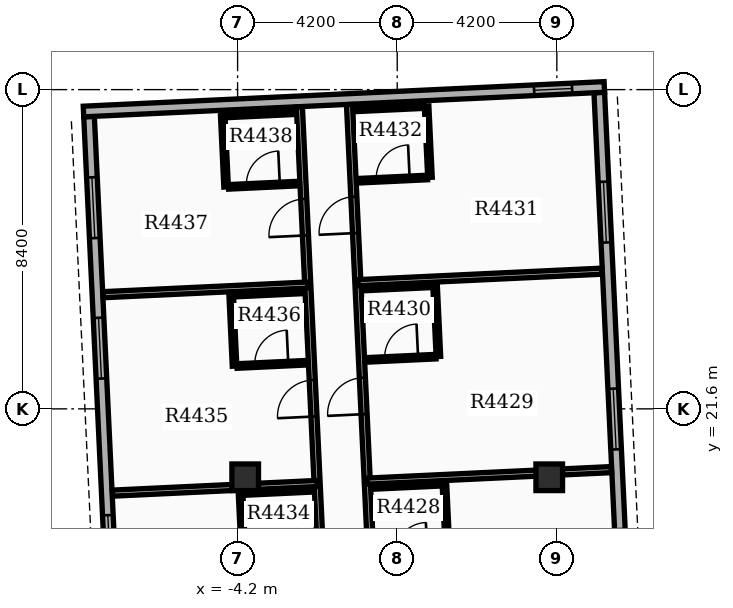
"""IFC4 building model, lengths in metres.
Left out: names, types, materials, properties, quantities, classifications, styles, units other than length and angle.
Written with IfcOpenShell. Run it as: python <this file> out.ifc"""

import sys

from ifc_helpers import new_model, si_unit, direction, frame, frame_2d, origin, origin_2d, place, context, subcontext, project, spatial, rectangle, extrude, element, fill, save


model = new_model("IFC4")
c1 = context("Model", 3, precision=1e-05, world=origin(), true_north=direction((0.0, 1.0)))
c2 = subcontext(c1, "Body", "Model", "MODEL_VIEW")
j1 = project(units=[si_unit("LENGTHUNIT", "METRE"), si_unit("PLANEANGLEUNIT", "RADIAN")], contexts=[c1])
p1 = place(None, origin())
s1 = spatial("IfcSite", under=j1, at=p1, CompositionType="ELEMENT")
p2 = place(p1, origin())
s2 = spatial("IfcBuilding", under=s1, at=p2, CompositionType="ELEMENT")
p3 = place(p2, frame((0.0, 0.0, 277.2)))
s3 = spatial("IfcBuildingStorey", under=s2, at=p3, CompositionType="ELEMENT", Elevation=277.2)
for number, where, z_axis, x_axis in (
    (1, (-4.0, 19.8, 0.0), (0.0, 0.0, 1.0), (1.0, 0.0, 0.0)),
    (2, (4.0, 19.8, 0.0), (0.0, 0.0, 1.0), (1.0, 0.0, 0.0)),
):
    element("IfcColumn", number, at=place(p3, frame(where, z_axis=z_axis, x_axis=x_axis)), inside=s3, PredefinedType="COLUMN", context=c2, shape_type="SweptSolid", body=[
        extrude(rectangle(XDim=0.7, YDim=0.7, at=origin_2d()), origin(), (0.0, 0.0, 1.0), 3.9),
    ])
p4 = place(p3, frame((6.009, 15.24, 0.0), z_axis=(0.0, 0.0, 1.0), x_axis=(-0.047101163748, 0.998890124275, 0.0)))
e3 = element("IfcWall", 3, at=p4, inside=s3, PredefinedType="STANDARD", context=c2, shape_type="SweptSolid", body=[
    extrude(rectangle(XDim=14.7, YDim=0.28, at=frame_2d((7.35, 0.0))), origin(), (0.0, 0.0, 1.0), 3.18),
])
p5 = place(p4, frame((1.6, 0.0, 0.8)))
e4 = element("IfcOpeningElement", 4, at=p5, cuts=e3, PredefinedType="OPENING", context=c2, shape_type="SweptSolid", body=[
    extrude(rectangle(XDim=1.6, YDim=1.7, at=frame_2d((0.8, 0.85))), frame((0.0, 0.15, 0.0), z_axis=(0.0, -1.0, 0.0), x_axis=(1.0, 0.0, 0.0)), (0.0, 0.0, 1.0), 0.3),
])
p6 = place(p4, frame((5.3, 0.0, 0.8)))
e5 = element("IfcOpeningElement", 5, at=p6, cuts=e3, PredefinedType="OPENING", context=c2, shape_type="SweptSolid", body=[
    extrude(rectangle(XDim=1.6, YDim=1.7, at=frame_2d((0.8, 0.85))), frame((0.0, 0.15, 0.0), z_axis=(0.0, -1.0, 0.0), x_axis=(1.0, 0.0, 0.0)), (0.0, 0.0, 1.0), 0.3),
])
p7 = place(p4, frame((10.75, 0.0, 0.8)))
e6 = element("IfcOpeningElement", 6, at=p7, cuts=e3, PredefinedType="OPENING", context=c2, shape_type="SweptSolid", body=[
    extrude(rectangle(XDim=1.6, YDim=1.7, at=frame_2d((0.8, 0.85))), frame((0.0, 0.15, 0.0), z_axis=(0.0, -1.0, 0.0), x_axis=(1.0, 0.0, 0.0)), (0.0, 0.0, 1.0), 0.3),
])
p8 = place(p3, frame((-8.109, 29.291, 0.0), z_axis=(0.0, 0.0, 1.0), x_axis=(0.047117735191, -0.998889342735, 0.0)))
e7 = element("IfcWall", 7, at=p8, inside=s3, PredefinedType="STANDARD", context=c2, shape_type="SweptSolid", body=[
    extrude(rectangle(XDim=14.7, YDim=0.28, at=frame_2d((7.35, 0.0))), origin(), (0.0, 0.0, 1.0), 3.18),
])
p9 = place(p8, frame((1.6, 0.0, 0.8)))
e8 = element("IfcOpeningElement", 8, at=p9, cuts=e7, PredefinedType="OPENING", context=c2, shape_type="SweptSolid", body=[
    extrude(rectangle(XDim=1.6, YDim=1.7, at=frame_2d((0.8, 0.85))), frame((0.0, 0.15, 0.0), z_axis=(0.0, -1.0, 0.0), x_axis=(1.0, 0.0, 0.0)), (0.0, 0.0, 1.0), 0.3),
])
p10 = place(p8, frame((5.3, 0.0, 0.8)))
e9 = element("IfcOpeningElement", 9, at=p10, cuts=e7, PredefinedType="OPENING", context=c2, shape_type="SweptSolid", body=[
    extrude(rectangle(XDim=1.6, YDim=1.7, at=frame_2d((0.8, 0.85))), frame((0.0, 0.15, 0.0), z_axis=(0.0, -1.0, 0.0), x_axis=(1.0, 0.0, 0.0)), (0.0, 0.0, 1.0), 0.3),
])
p11 = place(p8, frame((10.5, 0.0, 0.8)))
e10 = element("IfcOpeningElement", 10, at=p11, cuts=e7, PredefinedType="OPENING", context=c2, shape_type="SweptSolid", body=[
    extrude(rectangle(XDim=1.6, YDim=1.7, at=frame_2d((0.8, 0.85))), frame((0.0, 0.15, 0.0), z_axis=(0.0, -1.0, 0.0), x_axis=(1.0, 0.0, 0.0)), (0.0, 0.0, 1.0), 0.3),
])
p12 = place(p3, frame((5.45, 30.07, 0.0), z_axis=(0.0, 0.0, 1.0), x_axis=(-0.998890092147, -0.047101845086, 0.0)))
e11 = element("IfcWall", 11, at=p12, inside=s3, PredefinedType="STANDARD", context=c2, shape_type="SweptSolid", body=[
    extrude(rectangle(XDim=13.72, YDim=0.28, at=frame_2d((6.86, 0.0))), origin(), (0.0, 0.0, 1.0), 3.18),
])
p13 = place(p12, frame((0.85, 0.0, 0.85)))
e12 = element("IfcOpeningElement", 12, at=p13, cuts=e11, PredefinedType="OPENING", context=c2, shape_type="SweptSolid", body=[
    extrude(rectangle(XDim=1.0, YDim=1.5, at=frame_2d((0.5, 0.75))), frame((0.0, 0.15, 0.0), z_axis=(0.0, -1.0, 0.0), x_axis=(1.0, 0.0, 0.0)), (0.0, 0.0, 1.0), 0.3),
])
p14 = place(p3, frame((-0.549, 14.61, 0.0), z_axis=(0.0, 0.0, 1.0), x_axis=(-0.047113901593, 0.998889523559, 0.0)))
e13 = element("IfcWall", 13, at=p14, inside=s3, PredefinedType="PARTITIONING", context=c2, shape_type="SweptSolid", body=[
    extrude(rectangle(XDim=15.012, YDim=0.16, at=frame_2d((7.506, 0.0))), origin(), (0.0, 0.0, 1.0), 3.17),
])
p15 = place(p14, frame((1.122, 0.0, 0.0)))
e14 = element("IfcOpeningElement", 14, at=p15, cuts=e13, PredefinedType="OPENING", context=c2, shape_type="SweptSolid", body=[
    extrude(rectangle(XDim=0.96, YDim=2.15, at=frame_2d((0.48, 1.075))), frame((0.0, 0.09, 0.0), z_axis=(0.0, -1.0, 0.0), x_axis=(1.0, 0.0, 0.0)), (0.0, 0.0, 1.0), 0.18),
])
p16 = place(p14, frame((6.858, 0.0, 0.0)))
e15 = element("IfcOpeningElement", 15, at=p16, cuts=e13, PredefinedType="OPENING", context=c2, shape_type="SweptSolid", body=[
    extrude(rectangle(XDim=0.96, YDim=2.15, at=frame_2d((0.48, 1.075))), frame((0.0, 0.09, 0.0), z_axis=(0.0, -1.0, 0.0), x_axis=(1.0, 0.0, 0.0)), (0.0, 0.0, 1.0), 0.18),
])
p17 = place(p14, frame((11.628, 0.0, 0.0)))
e16 = element("IfcOpeningElement", 16, at=p17, cuts=e13, PredefinedType="OPENING", context=c2, shape_type="SweptSolid", body=[
    extrude(rectangle(XDim=0.96, YDim=2.15, at=frame_2d((0.48, 1.075))), frame((0.0, 0.09, 0.0), z_axis=(0.0, -1.0, 0.0), x_axis=(1.0, 0.0, 0.0)), (0.0, 0.0, 1.0), 0.18),
])
p18 = place(p3, frame((-0.789, 19.699, 0.0), z_axis=(0.0, 0.0, 1.0), x_axis=(0.99888993043, 0.047105274497, 0.0)))
e17 = element("IfcWall", 17, at=p18, inside=s3, PredefinedType="PARTITIONING", context=c2, shape_type="SweptSolid", body=[
    extrude(rectangle(XDim=6.432, YDim=0.16, at=frame_2d((3.216, 0.0))), origin(), (0.0, 0.0, 1.0), 3.17),
])
p19 = place(p3, frame((-0.641, 19.545, 0.0), z_axis=(0.0, 0.0, 1.0), x_axis=(0.998890786574, 0.047087116047, 0.0)))
e18 = element("IfcWall", 18, at=p19, inside=s3, PredefinedType="PARTITIONING", context=c2, shape_type="SweptSolid", body=[
    extrude(rectangle(XDim=1.82, YDim=0.12, at=frame_2d((0.91, 0.0))), origin(), (0.0, 0.0, 1.0), 3.17),
])
p20 = place(p3, frame((1.33, 17.756, 0.0), z_axis=(0.0, 0.0, 1.0), x_axis=(-0.047139425368, 0.998888319371, 0.0)))
e19 = element("IfcWall", 19, at=p20, inside=s3, PredefinedType="PARTITIONING", context=c2, shape_type="SweptSolid", body=[
    extrude(rectangle(XDim=1.88, YDim=0.12, at=frame_2d((0.94, 0.0))), origin(), (0.0, 0.0, 1.0), 3.17),
])
p21 = place(p3, frame((-1.035, 24.92, 0.0), z_axis=(0.0, 0.0, 1.0), x_axis=(0.99888993043, 0.047105274497, 0.0)))
e20 = element("IfcWall", 20, at=p21, inside=s3, PredefinedType="PARTITIONING", context=c2, shape_type="SweptSolid", body=[
    extrude(rectangle(XDim=6.432, YDim=0.16, at=frame_2d((3.216, 0.0))), origin(), (0.0, 0.0, 1.0), 3.17),
])
p22 = place(p3, frame((-0.799, 22.889, 0.0), z_axis=(0.0, 0.0, 1.0), x_axis=(0.998890786574, 0.047087116047, 0.0)))
e21 = element("IfcWall", 21, at=p22, inside=s3, PredefinedType="PARTITIONING", context=c2, shape_type="SweptSolid", body=[
    extrude(rectangle(XDim=1.82, YDim=0.12, at=frame_2d((0.91, 0.0))), origin(), (0.0, 0.0, 1.0), 3.17),
])
p23 = place(p22, frame((0.47, 0.0, 0.0)))
e22 = element("IfcOpeningElement", 22, at=p23, cuts=e21, PredefinedType="OPENING", context=c2, shape_type="SweptSolid", body=[
    extrude(rectangle(XDim=0.88, YDim=2.1, at=frame_2d((0.44, 1.05))), frame((0.0, 0.07, 0.0), z_axis=(0.0, -1.0, 0.0), x_axis=(1.0, 0.0, 0.0)), (0.0, 0.0, 1.0), 0.14),
])
p24 = place(p3, frame((-0.888, 24.767, 0.0), z_axis=(0.0, 0.0, 1.0), x_axis=(0.998891083954, 0.047080807099, 0.0)))
e23 = element("IfcWall", 23, at=p24, inside=s3, PredefinedType="PARTITIONING", context=c2, shape_type="SweptSolid", body=[
    extrude(rectangle(XDim=1.82, YDim=0.12, at=frame_2d((0.91, 0.0))), origin(), (0.0, 0.0, 1.0), 3.17),
])
p25 = place(p3, frame((1.084, 22.978, 0.0), z_axis=(0.0, 0.0, 1.0), x_axis=(-0.04700985207, 0.998894425757, 0.0)))
e24 = element("IfcWall", 24, at=p25, inside=s3, PredefinedType="PARTITIONING", context=c2, shape_type="SweptSolid", body=[
    extrude(rectangle(XDim=1.88, YDim=0.12, at=frame_2d((0.94, 0.0))), origin(), (0.0, 0.0, 1.0), 3.17),
])
p26 = place(p3, frame((-1.021, 27.603, 0.0), z_axis=(0.0, 0.0, 1.0), x_axis=(0.998891083954, 0.047080807099, 0.0)))
e25 = element("IfcWall", 25, at=p26, inside=s3, PredefinedType="PARTITIONING", context=c2, shape_type="SweptSolid", body=[
    extrude(rectangle(XDim=1.82, YDim=0.12, at=frame_2d((0.91, 0.0))), origin(), (0.0, 0.0, 1.0), 3.17),
])
p27 = place(p26, frame((0.47, 0.0, 0.0)))
e26 = element("IfcOpeningElement", 26, at=p27, cuts=e25, PredefinedType="OPENING", context=c2, shape_type="SweptSolid", body=[
    extrude(rectangle(XDim=0.88, YDim=2.1, at=frame_2d((0.44, 1.05))), frame((0.0, 0.07, 0.0), z_axis=(0.0, -1.0, 0.0), x_axis=(1.0, 0.0, 0.0)), (0.0, 0.0, 1.0), 0.14),
])
p28 = place(p3, frame((-1.11, 29.48, 0.0), z_axis=(0.0, 0.0, 1.0), x_axis=(0.998891083954, 0.047080807099, 0.0)))
e27 = element("IfcWall", 27, at=p28, inside=s3, PredefinedType="PARTITIONING", context=c2, shape_type="SweptSolid", body=[
    extrude(rectangle(XDim=1.82, YDim=0.12, at=frame_2d((0.91, 0.0))), origin(), (0.0, 0.0, 1.0), 3.17),
])
p29 = place(p3, frame((0.862, 27.691, 0.0), z_axis=(0.0, 0.0, 1.0), x_axis=(-0.047145540913, 0.998888030748, 0.0)))
e28 = element("IfcWall", 28, at=p29, inside=s3, PredefinedType="PARTITIONING", context=c2, shape_type="SweptSolid", body=[
    extrude(rectangle(XDim=1.88, YDim=0.12, at=frame_2d((0.94, 0.0))), origin(), (0.0, 0.0, 1.0), 3.17),
])
p30 = place(p3, frame((-1.867, 14.548, 0.0), z_axis=(0.0, 0.0, 1.0), x_axis=(-0.047097674677, 0.998890288791, 0.0)))
e29 = element("IfcWall", 29, at=p30, inside=s3, PredefinedType="PARTITIONING", context=c2, shape_type="SweptSolid", body=[
    extrude(rectangle(XDim=15.012, YDim=0.16, at=frame_2d((7.506, 0.0))), origin(), (0.0, 0.0, 1.0), 3.17),
])
p31 = place(p30, frame((1.122, 0.0, 0.0)))
e30 = element("IfcOpeningElement", 30, at=p31, cuts=e29, PredefinedType="OPENING", context=c2, shape_type="SweptSolid", body=[
    extrude(rectangle(XDim=0.96, YDim=2.15, at=frame_2d((0.48, 1.075))), frame((0.0, 0.09, 0.0), z_axis=(0.0, -1.0, 0.0), x_axis=(1.0, 0.0, 0.0)), (0.0, 0.0, 1.0), 0.18),
])
p32 = place(p30, frame((6.858, 0.0, 0.0)))
e31 = element("IfcOpeningElement", 31, at=p32, cuts=e29, PredefinedType="OPENING", context=c2, shape_type="SweptSolid", body=[
    extrude(rectangle(XDim=0.96, YDim=2.15, at=frame_2d((0.48, 1.075))), frame((0.0, 0.09, 0.0), z_axis=(0.0, -1.0, 0.0), x_axis=(1.0, 0.0, 0.0)), (0.0, 0.0, 1.0), 0.18),
])
p33 = place(p30, frame((11.628, 0.0, 0.0)))
e32 = element("IfcOpeningElement", 32, at=p33, cuts=e29, PredefinedType="OPENING", context=c2, shape_type="SweptSolid", body=[
    extrude(rectangle(XDim=0.96, YDim=2.15, at=frame_2d((0.48, 1.075))), frame((0.0, 0.09, 0.0), z_axis=(0.0, -1.0, 0.0), x_axis=(1.0, 0.0, 0.0)), (0.0, 0.0, 1.0), 0.18),
])
p34 = place(p3, frame((-2.107, 19.636, 0.0), z_axis=(0.0, 0.0, 1.0), x_axis=(-0.99889066387, -0.04708971898, 0.0)))
e33 = element("IfcWall", 33, at=p34, inside=s3, PredefinedType="PARTITIONING", context=c2, shape_type="SweptSolid", body=[
    extrude(rectangle(XDim=5.392, YDim=0.16, at=frame_2d((2.696, 0.0))), origin(), (0.0, 0.0, 1.0), 3.17),
])
p35 = place(p3, frame((-4.058, 19.385, 0.0), z_axis=(0.0, 0.0, 1.0), x_axis=(0.998890786574, 0.047087116047, 0.0)))
e34 = element("IfcWall", 34, at=p35, inside=s3, PredefinedType="PARTITIONING", context=c2, shape_type="SweptSolid", body=[
    extrude(rectangle(XDim=1.82, YDim=0.12, at=frame_2d((0.91, 0.0))), origin(), (0.0, 0.0, 1.0), 3.17),
])
p36 = place(p3, frame((-4.034, 17.503, 0.0), z_axis=(0.0, 0.0, 1.0), x_axis=(-0.047139425368, 0.998888319371, 0.0)))
e35 = element("IfcWall", 35, at=p36, inside=s3, PredefinedType="PARTITIONING", context=c2, shape_type="SweptSolid", body=[
    extrude(rectangle(XDim=1.88, YDim=0.12, at=frame_2d((0.94, 0.0))), origin(), (0.0, 0.0, 1.0), 3.17),
])
p37 = place(p3, frame((-2.354, 24.858, 0.0), z_axis=(0.0, 0.0, 1.0), x_axis=(-0.99889066387, -0.04708971898, 0.0)))
e36 = element("IfcWall", 36, at=p37, inside=s3, PredefinedType="PARTITIONING", context=c2, shape_type="SweptSolid", body=[
    extrude(rectangle(XDim=5.392, YDim=0.16, at=frame_2d((2.696, 0.0))), origin(), (0.0, 0.0, 1.0), 3.17),
])
p38 = place(p3, frame((-4.215, 22.728, 0.0), z_axis=(0.0, 0.0, 1.0), x_axis=(0.998891083954, 0.047080807099, 0.0)))
e37 = element("IfcWall", 37, at=p38, inside=s3, PredefinedType="PARTITIONING", context=c2, shape_type="SweptSolid", body=[
    extrude(rectangle(XDim=1.82, YDim=0.12, at=frame_2d((0.91, 0.0))), origin(), (0.0, 0.0, 1.0), 3.17),
])
p39 = place(p38, frame((0.47, 0.0, 0.0)))
e38 = element("IfcOpeningElement", 38, at=p39, cuts=e37, PredefinedType="OPENING", context=c2, shape_type="SweptSolid", body=[
    extrude(rectangle(XDim=0.88, YDim=2.1, at=frame_2d((0.44, 1.05))), frame((0.0, 0.07, 0.0), z_axis=(0.0, -1.0, 0.0), x_axis=(1.0, 0.0, 0.0)), (0.0, 0.0, 1.0), 0.14),
])
p40 = place(p3, frame((-4.304, 24.606, 0.0), z_axis=(0.0, 0.0, 1.0), x_axis=(0.998891083954, 0.047080807099, 0.0)))
e39 = element("IfcWall", 39, at=p40, inside=s3, PredefinedType="PARTITIONING", context=c2, shape_type="SweptSolid", body=[
    extrude(rectangle(XDim=1.82, YDim=0.12, at=frame_2d((0.91, 0.0))), origin(), (0.0, 0.0, 1.0), 3.17),
])
p41 = place(p3, frame((-4.28, 22.725, 0.0), z_axis=(0.0, 0.0, 1.0), x_axis=(-0.047139425368, 0.998888319371, 0.0)))
e40 = element("IfcWall", 40, at=p41, inside=s3, PredefinedType="PARTITIONING", context=c2, shape_type="SweptSolid", body=[
    extrude(rectangle(XDim=1.88, YDim=0.12, at=frame_2d((0.94, 0.0))), origin(), (0.0, 0.0, 1.0), 3.17),
])
p42 = place(p3, frame((-4.438, 27.441, 0.0), z_axis=(0.0, 0.0, 1.0), x_axis=(0.998890786574, 0.047087116047, 0.0)))
e41 = element("IfcWall", 41, at=p42, inside=s3, PredefinedType="PARTITIONING", context=c2, shape_type="SweptSolid", body=[
    extrude(rectangle(XDim=1.82, YDim=0.12, at=frame_2d((0.91, 0.0))), origin(), (0.0, 0.0, 1.0), 3.17),
])
p43 = place(p42, frame((0.47, 0.0, 0.0)))
e42 = element("IfcOpeningElement", 42, at=p43, cuts=e41, PredefinedType="OPENING", context=c2, shape_type="SweptSolid", body=[
    extrude(rectangle(XDim=0.88, YDim=2.1, at=frame_2d((0.44, 1.05))), frame((0.0, 0.07, 0.0), z_axis=(0.0, -1.0, 0.0), x_axis=(1.0, 0.0, 0.0)), (0.0, 0.0, 1.0), 0.14),
])
p44 = place(p3, frame((-4.526, 29.319, 0.0), z_axis=(0.0, 0.0, 1.0), x_axis=(0.998890786574, 0.047087116047, 0.0)))
e43 = element("IfcWall", 43, at=p44, inside=s3, PredefinedType="PARTITIONING", context=c2, shape_type="SweptSolid", body=[
    extrude(rectangle(XDim=1.82, YDim=0.12, at=frame_2d((0.91, 0.0))), origin(), (0.0, 0.0, 1.0), 3.17),
])
p45 = place(p3, frame((-4.502, 27.438, 0.0), z_axis=(0.0, 0.0, 1.0), x_axis=(-0.047139425368, 0.998888319371, 0.0)))
e44 = element("IfcWall", 44, at=p45, inside=s3, PredefinedType="PARTITIONING", context=c2, shape_type="SweptSolid", body=[
    extrude(rectangle(XDim=1.88, YDim=0.12, at=frame_2d((0.94, 0.0))), origin(), (0.0, 0.0, 1.0), 3.17),
])
p46 = place(p6, origin())
e45 = element("IfcWindow", 45, at=p46, inside=s3, PartitioningType="SINGLE_PANEL", PredefinedType="WINDOW", context=c2, shape_type="SweptSolid", body=[
    extrude(rectangle(XDim=1.6, YDim=1.7, at=frame_2d((0.8, 0.85))), frame((0.0, 0.03, 0.0), z_axis=(0.0, -1.0, 0.0), x_axis=(1.0, 0.0, 0.0)), (0.0, 0.0, 1.0), 0.06),
])
fill(e5, e45)
p47 = place(p7, origin())
e46 = element("IfcWindow", 46, at=p47, inside=s3, PartitioningType="SINGLE_PANEL", PredefinedType="WINDOW", context=c2, shape_type="SweptSolid", body=[
    extrude(rectangle(XDim=1.6, YDim=1.7, at=frame_2d((0.8, 0.85))), frame((0.0, 0.03, 0.0), z_axis=(0.0, -1.0, 0.0), x_axis=(1.0, 0.0, 0.0)), (0.0, 0.0, 1.0), 0.06),
])
fill(e6, e46)
p48 = place(p9, origin())
e47 = element("IfcWindow", 47, at=p48, inside=s3, PartitioningType="SINGLE_PANEL", PredefinedType="WINDOW", context=c2, shape_type="SweptSolid", body=[
    extrude(rectangle(XDim=1.6, YDim=1.7, at=frame_2d((0.8, 0.85))), frame((0.0, 0.03, 0.0), z_axis=(0.0, -1.0, 0.0), x_axis=(1.0, 0.0, 0.0)), (0.0, 0.0, 1.0), 0.06),
])
fill(e8, e47)
p49 = place(p10, origin())
e48 = element("IfcWindow", 48, at=p49, inside=s3, PartitioningType="SINGLE_PANEL", PredefinedType="WINDOW", context=c2, shape_type="SweptSolid", body=[
    extrude(rectangle(XDim=1.6, YDim=1.7, at=frame_2d((0.8, 0.85))), frame((0.0, 0.03, 0.0), z_axis=(0.0, -1.0, 0.0), x_axis=(1.0, 0.0, 0.0)), (0.0, 0.0, 1.0), 0.06),
])
fill(e9, e48)
p50 = place(p11, origin())
e49 = element("IfcWindow", 49, at=p50, inside=s3, PartitioningType="SINGLE_PANEL", PredefinedType="WINDOW", context=c2, shape_type="SweptSolid", body=[
    extrude(rectangle(XDim=1.6, YDim=1.7, at=frame_2d((0.8, 0.85))), frame((0.0, 0.03, 0.0), z_axis=(0.0, -1.0, 0.0), x_axis=(1.0, 0.0, 0.0)), (0.0, 0.0, 1.0), 0.06),
])
fill(e10, e49)
p51 = place(p13, origin())
e50 = element("IfcWindow", 50, at=p51, inside=s3, PartitioningType="SINGLE_PANEL", PredefinedType="WINDOW", context=c2, shape_type="SweptSolid", body=[
    extrude(rectangle(XDim=1.0, YDim=1.5, at=frame_2d((0.5, 0.75))), frame((0.0, 0.03, 0.0), z_axis=(0.0, -1.0, 0.0), x_axis=(1.0, 0.0, 0.0)), (0.0, 0.0, 1.0), 0.06),
])
fill(e12, e50)
p52 = place(p16, origin())
e51 = element("IfcDoor", 51, at=p52, inside=s3, OperationType="SINGLE_SWING_LEFT", PredefinedType="DOOR", context=c2, shape_type="SweptSolid", body=[
    extrude(rectangle(XDim=0.96, YDim=2.15, at=frame_2d((0.48, 1.075))), frame((0.0, 0.025, 0.0), z_axis=(0.0, -1.0, 0.0), x_axis=(1.0, 0.0, 0.0)), (0.0, 0.0, 1.0), 0.05),
])
fill(e15, e51)
p53 = place(p23, origin())
e52 = element("IfcDoor", 52, at=p53, inside=s3, OperationType="SINGLE_SWING_RIGHT", PredefinedType="DOOR", context=c2, shape_type="SweptSolid", body=[
    extrude(rectangle(XDim=0.88, YDim=2.1, at=frame_2d((0.44, 1.05))), frame((0.0, 0.025, 0.0), z_axis=(0.0, -1.0, 0.0), x_axis=(1.0, 0.0, 0.0)), (0.0, 0.0, 1.0), 0.05),
])
fill(e22, e52)
p54 = place(p17, origin())
e53 = element("IfcDoor", 53, at=p54, inside=s3, OperationType="SINGLE_SWING_LEFT", PredefinedType="DOOR", context=c2, shape_type="SweptSolid", body=[
    extrude(rectangle(XDim=0.96, YDim=2.15, at=frame_2d((0.48, 1.075))), frame((0.0, 0.025, 0.0), z_axis=(0.0, -1.0, 0.0), x_axis=(1.0, 0.0, 0.0)), (0.0, 0.0, 1.0), 0.05),
])
fill(e16, e53)
p55 = place(p27, origin())
e54 = element("IfcDoor", 54, at=p55, inside=s3, OperationType="SINGLE_SWING_RIGHT", PredefinedType="DOOR", context=c2, shape_type="SweptSolid", body=[
    extrude(rectangle(XDim=0.88, YDim=2.1, at=frame_2d((0.44, 1.05))), frame((0.0, 0.025, 0.0), z_axis=(0.0, -1.0, 0.0), x_axis=(1.0, 0.0, 0.0)), (0.0, 0.0, 1.0), 0.05),
])
fill(e26, e54)
p56 = place(p32, origin())
e55 = element("IfcDoor", 55, at=p56, inside=s3, OperationType="SINGLE_SWING_LEFT", PredefinedType="DOOR", context=c2, shape_type="SweptSolid", body=[
    extrude(rectangle(XDim=0.96, YDim=2.15, at=frame_2d((0.48, 1.075))), frame((0.0, 0.025, 0.0), z_axis=(0.0, -1.0, 0.0), x_axis=(1.0, 0.0, 0.0)), (0.0, 0.0, 1.0), 0.05),
])
fill(e31, e55)
p57 = place(p39, origin())
e56 = element("IfcDoor", 56, at=p57, inside=s3, OperationType="SINGLE_SWING_RIGHT", PredefinedType="DOOR", context=c2, shape_type="SweptSolid", body=[
    extrude(rectangle(XDim=0.88, YDim=2.1, at=frame_2d((0.44, 1.05))), frame((0.0, 0.025, 0.0), z_axis=(0.0, -1.0, 0.0), x_axis=(1.0, 0.0, 0.0)), (0.0, 0.0, 1.0), 0.05),
])
fill(e38, e56)
p58 = place(p33, origin())
e57 = element("IfcDoor", 57, at=p58, inside=s3, OperationType="SINGLE_SWING_LEFT", PredefinedType="DOOR", context=c2, shape_type="SweptSolid", body=[
    extrude(rectangle(XDim=0.96, YDim=2.15, at=frame_2d((0.48, 1.075))), frame((0.0, 0.025, 0.0), z_axis=(0.0, -1.0, 0.0), x_axis=(1.0, 0.0, 0.0)), (0.0, 0.0, 1.0), 0.05),
])
fill(e32, e57)
p59 = place(p43, origin())
e58 = element("IfcDoor", 58, at=p59, inside=s3, OperationType="SINGLE_SWING_RIGHT", PredefinedType="DOOR", context=c2, shape_type="SweptSolid", body=[
    extrude(rectangle(XDim=0.88, YDim=2.1, at=frame_2d((0.44, 1.05))), frame((0.0, 0.025, 0.0), z_axis=(0.0, -1.0, 0.0), x_axis=(1.0, 0.0, 0.0)), (0.0, 0.0, 1.0), 0.05),
])
fill(e42, e58)
save(model, sys.argv[1])
